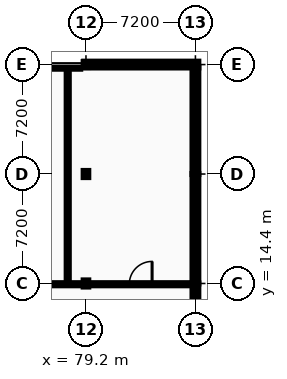
"""IFC4 building model, lengths in metres.
Left out: names, types, materials, properties, quantities, classifications, styles, units other than length and angle.
Written with IfcOpenShell. Run it as: python <this file> out.ifc"""

import sys

from ifc_helpers import new_model, si_unit, direction, frame, frame_2d, origin, origin_2d, place, context, subcontext, project, spatial, rectangle, i_section, extrude, element, fill, save


model = new_model("IFC4")
c1 = context("Model", 3, precision=1e-05, world=origin(), true_north=direction((0.0, 1.0)))
c2 = subcontext(c1, "Body", "Model", "MODEL_VIEW")
j1 = project(units=[si_unit("LENGTHUNIT", "METRE"), si_unit("PLANEANGLEUNIT", "RADIAN")], contexts=[c1])
p1 = place(None, origin())
s1 = spatial("IfcSite", under=j1, at=p1, CompositionType="ELEMENT")
p2 = place(p1, origin())
s2 = spatial("IfcBuilding", under=s1, at=p2, CompositionType="ELEMENT")
p3 = place(p2, frame((0.0, 0.0, 5.2)))
s3 = spatial("IfcBuildingStorey", under=s2, at=p3, CompositionType="ELEMENT", Elevation=5.2)
for number, where, z_axis, x_axis in (
    (1, (79.2, 14.4, 0.0), (0.0, 0.0, 1.0), (1.0, 0.0, 0.0)),
    (2, (79.2, 21.6, 0.0), (0.0, 0.0, 1.0), (1.0, 0.0, 0.0)),
):
    element("IfcColumn", number, at=place(p3, frame(where, z_axis=z_axis, x_axis=x_axis)), inside=s3, PredefinedType="COLUMN", context=c2, shape_type="SweptSolid", body=[
        extrude(i_section(OverallWidth=0.3, OverallDepth=0.4, WebThickness=0.013, FlangeThickness=0.024, FilletRadius=0.027, at=origin_2d()), origin(), (0.0, 0.0, 1.0), 4.4),
    ])
p4 = place(p3, frame((79.2, 28.8, 0.0), z_axis=(0.0, 0.0, 1.0), x_axis=(1.0, 0.0, 0.0)))
e3 = element("IfcColumn", 3, at=p4, inside=s3, PredefinedType="COLUMN", context=c2, shape_type="SweptSolid", body=[
    extrude(i_section(OverallWidth=0.3, OverallDepth=0.32, WebThickness=0.011, FlangeThickness=0.021, FilletRadius=0.027, at=origin_2d()), origin(), (0.0, 0.0, 1.0), 4.4),
])
for number, where, z_axis, x_axis in (
    (4, (86.4, 14.4, 0.0), (0.0, 0.0, 1.0), (1.0, 0.0, 0.0)),
    (5, (86.4, 21.6, 0.0), (0.0, 0.0, 1.0), (1.0, 0.0, 0.0)),
):
    element("IfcColumn", number, at=place(p3, frame(where, z_axis=z_axis, x_axis=x_axis)), inside=s3, PredefinedType="COLUMN", context=c2, shape_type="SweptSolid", body=[
        extrude(i_section(OverallWidth=0.3, OverallDepth=0.4, WebThickness=0.013, FlangeThickness=0.024, FilletRadius=0.027, at=origin_2d()), origin(), (0.0, 0.0, 1.0), 4.4),
    ])
p5 = place(p3, frame((86.4, 28.8, 0.0), z_axis=(0.0, 0.0, 1.0), x_axis=(1.0, 0.0, 0.0)))
e6 = element("IfcColumn", 6, at=p5, inside=s3, PredefinedType="COLUMN", context=c2, shape_type="SweptSolid", body=[
    extrude(i_section(OverallWidth=0.3, OverallDepth=0.32, WebThickness=0.011, FlangeThickness=0.021, FilletRadius=0.027, at=origin_2d()), origin(), (0.0, 0.0, 1.0), 4.4),
])
p6 = place(p3, frame((86.59, 28.8, 0.0), z_axis=(0.0, 0.0, 1.0), x_axis=(-1.0, 0.0, 0.0)))
e7 = element("IfcWall", 7, at=p6, inside=s3, PredefinedType="STANDARD", context=c2, shape_type="SweptSolid", body=[
    extrude(rectangle(XDim=7.5, YDim=0.38, at=frame_2d((3.75, 0.0))), origin(), (0.0, 0.0, 1.0), 3.88),
])
p7 = place(p6, frame((1.633, 0.0, 0.95)))
e8 = element("IfcOpeningElement", 8, at=p7, cuts=e7, PredefinedType="OPENING", context=c2, shape_type="SweptSolid", body=[
    extrude(rectangle(XDim=1.234, YDim=1.26, at=frame_2d((0.617, 0.63))), frame((0.0, 0.2, 0.0), z_axis=(0.0, -1.0, 0.0), x_axis=(1.0, 0.0, 0.0)), (0.0, 0.0, 1.0), 0.4),
])
p8 = place(p6, frame((4.633, 0.0, 0.95)))
e9 = element("IfcOpeningElement", 9, at=p8, cuts=e7, PredefinedType="OPENING", context=c2, shape_type="SweptSolid", body=[
    extrude(rectangle(XDim=1.234, YDim=1.26, at=frame_2d((0.617, 0.63))), frame((0.0, 0.2, 0.0), z_axis=(0.0, -1.0, 0.0), x_axis=(1.0, 0.0, 0.0)), (0.0, 0.0, 1.0), 0.4),
])
p9 = place(p3, frame((86.4, 8.9, 0.0), z_axis=(0.0, 0.0, 1.0), x_axis=(0.0, 1.0, 0.0)))
e10 = element("IfcWall", 10, at=p9, inside=s3, PredefinedType="STANDARD", context=c2, shape_type="SweptSolid", body=[
    extrude(rectangle(XDim=5.5, YDim=0.38, at=frame_2d((2.75, 0.0))), origin(), (0.0, 0.0, 1.0), 4.185),
])
p10 = place(p3, frame((86.4, 14.4, 0.0), z_axis=(0.0, 0.0, 1.0), x_axis=(0.0, 1.0, 0.0)))
e11 = element("IfcWall", 11, at=p10, inside=s3, PredefinedType="STANDARD", context=c2, shape_type="SweptSolid", body=[
    extrude(rectangle(XDim=7.2, YDim=0.38, at=frame_2d((3.6, 0.0))), origin(), (0.0, 0.0, 1.0), 3.81),
])
p11 = place(p10, frame((1.662, 0.0, 0.95)))
e12 = element("IfcOpeningElement", 12, at=p11, cuts=e11, PredefinedType="OPENING", context=c2, shape_type="SweptSolid", body=[
    extrude(rectangle(XDim=0.996, YDim=1.296, at=frame_2d((0.498, 0.648))), frame((0.0, 0.2, 0.0), z_axis=(0.0, -1.0, 0.0), x_axis=(1.0, 0.0, 0.0)), (0.0, 0.0, 1.0), 0.4),
])
p12 = place(p10, frame((4.542, 0.0, 0.95)))
e13 = element("IfcOpeningElement", 13, at=p12, cuts=e11, PredefinedType="OPENING", context=c2, shape_type="SweptSolid", body=[
    extrude(rectangle(XDim=0.996, YDim=1.296, at=frame_2d((0.498, 0.648))), frame((0.0, 0.2, 0.0), z_axis=(0.0, -1.0, 0.0), x_axis=(1.0, 0.0, 0.0)), (0.0, 0.0, 1.0), 0.4),
])
p13 = place(p3, frame((86.4, 21.6, 0.0), z_axis=(0.0, 0.0, 1.0), x_axis=(0.0, 1.0, 0.0)))
e14 = element("IfcWall", 14, at=p13, inside=s3, PredefinedType="STANDARD", context=c2, shape_type="SweptSolid", body=[
    extrude(rectangle(XDim=7.01, YDim=0.38, at=frame_2d((3.505, 0.0))), origin(), (0.0, 0.0, 1.0), 3.81),
])
p14 = place(p13, frame((1.588, 0.0, 0.95)))
e15 = element("IfcOpeningElement", 15, at=p14, cuts=e14, PredefinedType="OPENING", context=c2, shape_type="SweptSolid", body=[
    extrude(rectangle(XDim=1.03, YDim=1.296, at=frame_2d((0.515, 0.648))), frame((0.0, 0.2, 0.0), z_axis=(0.0, -1.0, 0.0), x_axis=(1.0, 0.0, 0.0)), (0.0, 0.0, 1.0), 0.4),
])
p15 = place(p13, frame((4.392, 0.0, 0.95)))
e16 = element("IfcOpeningElement", 16, at=p15, cuts=e14, PredefinedType="OPENING", context=c2, shape_type="SweptSolid", body=[
    extrude(rectangle(XDim=1.03, YDim=1.296, at=frame_2d((0.515, 0.648))), frame((0.0, 0.2, 0.0), z_axis=(0.0, -1.0, 0.0), x_axis=(1.0, 0.0, 0.0)), (0.0, 0.0, 1.0), 0.4),
])
p16 = place(p3, frame((72.38, 14.35, 0.0), z_axis=(0.0, 0.0, 1.0), x_axis=(1.0, 0.0, 0.0)))
e17 = element("IfcWall", 17, at=p16, inside=s3, PredefinedType="PARTITIONING", context=c2, shape_type="SweptSolid", body=[
    extrude(rectangle(XDim=6.44, YDim=0.135, at=frame_2d((3.22, 0.0))), origin(), (0.0, 0.0, 1.0), 3.88),
])
p17 = place(p16, frame((2.318, 0.0, 0.0)))
e18 = element("IfcOpeningElement", 18, at=p17, cuts=e17, PredefinedType="OPENING", context=c2, shape_type="SweptSolid", body=[
    extrude(rectangle(XDim=0.984, YDim=2.124, at=frame_2d((0.492, 1.062))), frame((0.0, 0.078, 0.0), z_axis=(0.0, -1.0, 0.0), x_axis=(1.0, 0.0, 0.0)), (0.0, 0.0, 1.0), 0.155),
])
p18 = place(p3, frame((79.58, 14.35, 0.0), z_axis=(0.0, 0.0, 1.0), x_axis=(1.0, 0.0, 0.0)))
e19 = element("IfcWall", 19, at=p18, inside=s3, PredefinedType="PARTITIONING", context=c2, shape_type="SweptSolid", body=[
    extrude(rectangle(XDim=6.44, YDim=0.135, at=frame_2d((3.22, 0.0))), origin(), (0.0, 0.0, 1.0), 3.88),
])
p19 = place(p18, frame((2.47, 0.0, 0.0)))
e20 = element("IfcOpeningElement", 20, at=p19, cuts=e19, PredefinedType="OPENING", context=c2, shape_type="SweptSolid", body=[
    extrude(rectangle(XDim=1.5, YDim=2.2, at=frame_2d((0.75, 1.1))), frame((0.0, 0.078, 0.0), z_axis=(0.0, -1.0, 0.0), x_axis=(1.0, 0.0, 0.0)), (0.0, 0.0, 1.0), 0.155),
])
p20 = place(p3, frame((72.38, 28.6, 0.0), z_axis=(0.0, 0.0, 1.0), x_axis=(1.0, 0.0, 0.0)))
e21 = element("IfcWall", 21, at=p20, inside=s3, PredefinedType="PARTITIONING", context=c2, shape_type="SweptSolid", body=[
    extrude(rectangle(XDim=6.44, YDim=0.142, at=frame_2d((3.22, 0.0))), origin(), (0.0, 0.0, 1.0), 3.88),
])
p21 = place(p3, frame((78.0, 14.417, 0.0), z_axis=(0.0, 0.0, 1.0), x_axis=(0.0, 1.0, 0.0)))
e22 = element("IfcWall", 22, at=p21, inside=s3, PredefinedType="PARTITIONING", context=c2, shape_type="SweptSolid", body=[
    extrude(rectangle(XDim=14.112, YDim=0.135, at=frame_2d((7.056, 0.0))), origin(), (0.0, 0.0, 1.0), 4.185),
])
p22 = place(p7, origin())
e23 = element("IfcWindow", 23, at=p22, inside=s3, PartitioningType="SINGLE_PANEL", PredefinedType="WINDOW", context=c2, shape_type="SweptSolid", body=[
    extrude(rectangle(XDim=1.234, YDim=1.26, at=frame_2d((0.617, 0.63))), frame((0.0, 0.03, 0.0), z_axis=(0.0, -1.0, 0.0), x_axis=(1.0, 0.0, 0.0)), (0.0, 0.0, 1.0), 0.06),
])
fill(e8, e23)
p23 = place(p8, origin())
e24 = element("IfcWindow", 24, at=p23, inside=s3, PartitioningType="SINGLE_PANEL", PredefinedType="WINDOW", context=c2, shape_type="SweptSolid", body=[
    extrude(rectangle(XDim=1.234, YDim=1.26, at=frame_2d((0.617, 0.63))), frame((0.0, 0.03, 0.0), z_axis=(0.0, -1.0, 0.0), x_axis=(1.0, 0.0, 0.0)), (0.0, 0.0, 1.0), 0.06),
])
fill(e9, e24)
p24 = place(p11, origin())
e25 = element("IfcWindow", 25, at=p24, inside=s3, PartitioningType="SINGLE_PANEL", PredefinedType="WINDOW", context=c2, shape_type="SweptSolid", body=[
    extrude(rectangle(XDim=0.996, YDim=1.296, at=frame_2d((0.498, 0.648))), frame((0.0, 0.03, 0.0), z_axis=(0.0, -1.0, 0.0), x_axis=(1.0, 0.0, 0.0)), (0.0, 0.0, 1.0), 0.06),
])
fill(e12, e25)
p25 = place(p12, origin())
e26 = element("IfcWindow", 26, at=p25, inside=s3, PartitioningType="SINGLE_PANEL", PredefinedType="WINDOW", context=c2, shape_type="SweptSolid", body=[
    extrude(rectangle(XDim=0.996, YDim=1.296, at=frame_2d((0.498, 0.648))), frame((0.0, 0.03, 0.0), z_axis=(0.0, -1.0, 0.0), x_axis=(1.0, 0.0, 0.0)), (0.0, 0.0, 1.0), 0.06),
])
fill(e13, e26)
p26 = place(p14, origin())
e27 = element("IfcWindow", 27, at=p26, inside=s3, PartitioningType="SINGLE_PANEL", PredefinedType="WINDOW", context=c2, shape_type="SweptSolid", body=[
    extrude(rectangle(XDim=1.03, YDim=1.296, at=frame_2d((0.515, 0.648))), frame((0.0, 0.03, 0.0), z_axis=(0.0, -1.0, 0.0), x_axis=(1.0, 0.0, 0.0)), (0.0, 0.0, 1.0), 0.06),
])
fill(e15, e27)
p27 = place(p15, origin())
e28 = element("IfcWindow", 28, at=p27, inside=s3, PartitioningType="SINGLE_PANEL", PredefinedType="WINDOW", context=c2, shape_type="SweptSolid", body=[
    extrude(rectangle(XDim=1.03, YDim=1.296, at=frame_2d((0.515, 0.648))), frame((0.0, 0.03, 0.0), z_axis=(0.0, -1.0, 0.0), x_axis=(1.0, 0.0, 0.0)), (0.0, 0.0, 1.0), 0.06),
])
fill(e16, e28)
p28 = place(p19, frame((1.5, 0.0, 0.0), z_axis=(0.0, 0.0, 1.0), x_axis=(-1.0, 0.0, 0.0)))
e29 = element("IfcDoor", 29, at=p28, inside=s3, OperationType="DOUBLE_DOOR_SINGLE_SWING", PredefinedType="DOOR", context=c2, shape_type="SweptSolid", body=[
    extrude(rectangle(XDim=1.5, YDim=2.2, at=frame_2d((0.75, 1.1))), frame((0.0, 0.025, 0.0), z_axis=(0.0, -1.0, 0.0), x_axis=(1.0, 0.0, 0.0)), (0.0, 0.0, 1.0), 0.05),
])
fill(e20, e29)
save(model, sys.argv[1])
